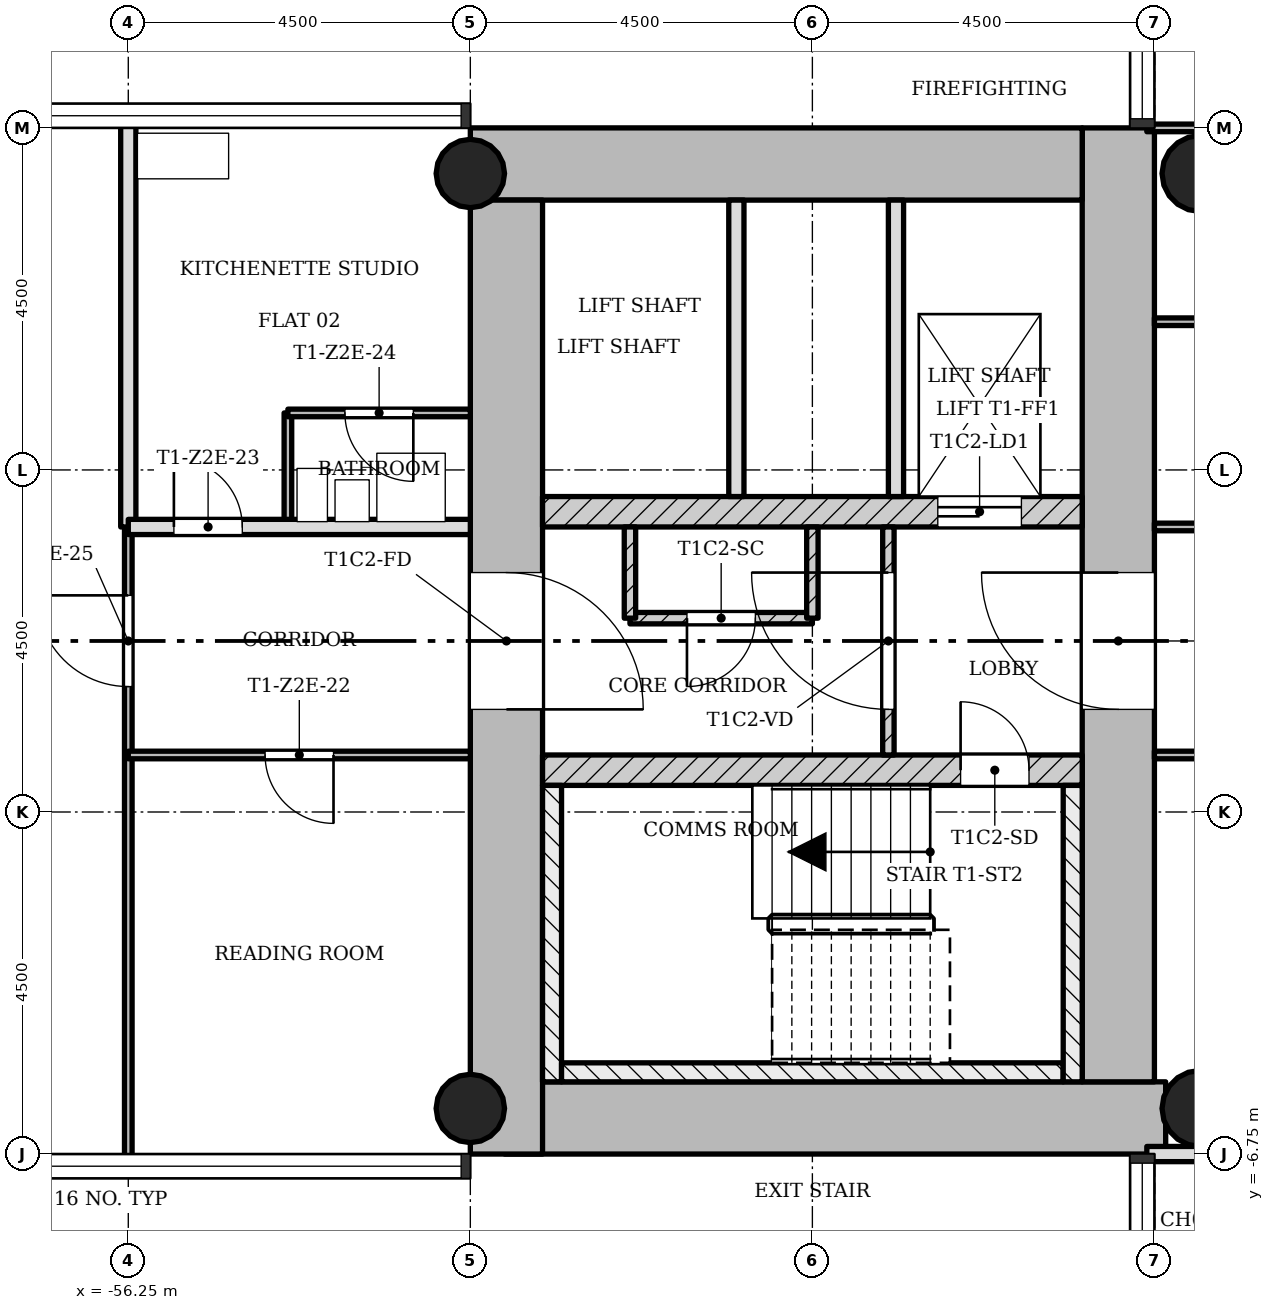
"""IFC4 building model, lengths in metres.
Left out: names, types, materials, properties, quantities, classifications, styles, units other than length and angle.
Written with IfcOpenShell. Run it as: python <this file> out.ifc"""

import sys

from ifc_helpers import new_model, si_unit, direction, frame, frame_2d, origin, origin_2d, place, context, subcontext, project, spatial, rectangle, hollow_circle, extrude, element, fill, save


model = new_model("IFC4")
c1 = context("Model", 3, precision=1e-05, world=origin(), true_north=direction((0.0, 1.0)))
c2 = subcontext(c1, "Body", "Model", "MODEL_VIEW")
j1 = project(units=[si_unit("LENGTHUNIT", "METRE"), si_unit("PLANEANGLEUNIT", "RADIAN")], contexts=[c1])
p1 = place(None, origin())
s1 = spatial("IfcSite", under=j1, at=p1, CompositionType="ELEMENT")
p2 = place(p1, origin())
s2 = spatial("IfcBuilding", under=s1, at=p2, CompositionType="ELEMENT")
p3 = place(p2, frame((0.0, 0.0, 103.8)))
s3 = spatial("IfcBuildingStorey", under=s2, at=p3, CompositionType="ELEMENT", Elevation=103.8)
p4 = place(p3, frame((-51.298, -6.275, 0.0), z_axis=(0.0, 0.0, 1.0), x_axis=(1.0, 0.0, 0.0)))
e1 = element("IfcWall", 1, at=p4, inside=s3, PredefinedType="SHEAR", context=c2, shape_type="SweptSolid", body=[
    extrude(rectangle(XDim=8.696, YDim=0.95, at=frame_2d((4.348, 0.0))), origin(), (0.0, 0.0, 1.0), 3.4),
])
p5 = place(p3, frame((-43.225, -5.8, 0.0), z_axis=(0.0, 0.0, 1.0), x_axis=(0.0, 1.0, 0.0)))
e2 = element("IfcWall", 2, at=p5, inside=s3, PredefinedType="SHEAR", context=c2, shape_type="SweptSolid", body=[
    extrude(rectangle(XDim=12.55, YDim=0.95, at=frame_2d((6.275, 0.0))), origin(), (0.0, 0.0, 1.0), 3.4),
])
p6 = place(p5, frame((4.9, 0.0, 0.0)))
e3 = element("IfcOpeningElement", 3, at=p6, cuts=e2, PredefinedType="OPENING", context=c2, shape_type="SweptSolid", body=[
    extrude(rectangle(XDim=1.8, YDim=2.1, at=frame_2d((0.9, 1.05))), frame((0.0, 0.485, 0.0), z_axis=(0.0, -1.0, 0.0), x_axis=(1.0, 0.0, 0.0)), (0.0, 0.0, 1.0), 0.97),
])
p7 = place(p3, frame((-43.7, 6.275, 0.0), z_axis=(0.0, 0.0, 1.0), x_axis=(-1.0, 0.0, 0.0)))
e4 = element("IfcWall", 4, at=p7, inside=s3, PredefinedType="SHEAR", context=c2, shape_type="SweptSolid", body=[
    extrude(rectangle(XDim=8.05, YDim=0.95, at=frame_2d((4.025, 0.0))), origin(), (0.0, 0.0, 1.0), 3.4),
])
p8 = place(p3, frame((-51.275, 5.8, 0.0), z_axis=(0.0, 0.0, 1.0), x_axis=(0.0, -1.0, 0.0)))
e5 = element("IfcWall", 5, at=p8, inside=s3, PredefinedType="SHEAR", context=c2, shape_type="SweptSolid", body=[
    extrude(rectangle(XDim=12.55, YDim=0.95, at=frame_2d((6.275, 0.0))), origin(), (0.0, 0.0, 1.0), 3.4),
])
p9 = place(p8, frame((4.9, 0.0, 0.0)))
e6 = element("IfcOpeningElement", 6, at=p9, cuts=e5, PredefinedType="OPENING", context=c2, shape_type="SweptSolid", body=[
    extrude(rectangle(XDim=1.8, YDim=2.1, at=frame_2d((0.9, 1.05))), frame((0.0, 0.485, 0.0), z_axis=(0.0, -1.0, 0.0), x_axis=(1.0, 0.0, 0.0)), (0.0, 0.0, 1.0), 0.97),
])
p10 = place(p3, frame((-50.8, -1.7, 0.0), z_axis=(0.0, 0.0, 1.0), x_axis=(1.0, 0.0, 0.0)))
e7 = element("IfcWall", 7, at=p10, inside=s3, PredefinedType="SHEAR", context=c2, shape_type="SweptSolid", body=[
    extrude(rectangle(XDim=7.1, YDim=0.4, at=frame_2d((3.55, 0.0))), origin(), (0.0, 0.0, 1.0), 3.4),
])
p11 = place(p10, frame((5.5, 0.0, 0.0)))
e8 = element("IfcOpeningElement", 8, at=p11, cuts=e7, PredefinedType="OPENING", context=c2, shape_type="SweptSolid", body=[
    extrude(rectangle(XDim=0.9, YDim=2.1, at=frame_2d((0.45, 1.05))), frame((0.0, 0.21, 0.0), z_axis=(0.0, -1.0, 0.0), x_axis=(1.0, 0.0, 0.0)), (0.0, 0.0, 1.0), 0.42),
])
p12 = place(p3, frame((-50.8, 1.7, 0.0), z_axis=(0.0, 0.0, 1.0), x_axis=(1.0, 0.0, 0.0)))
e9 = element("IfcWall", 9, at=p12, inside=s3, PredefinedType="SHEAR", context=c2, shape_type="SweptSolid", body=[
    extrude(rectangle(XDim=7.1, YDim=0.4, at=frame_2d((3.55, 0.0))), origin(), (0.0, 0.0, 1.0), 3.4),
])
p13 = place(p12, frame((5.2, 0.0, 0.0)))
e10 = element("IfcOpeningElement", 10, at=p13, cuts=e9, PredefinedType="OPENING", context=c2, shape_type="SweptSolid", body=[
    extrude(rectangle(XDim=1.1, YDim=2.1, at=frame_2d((0.55, 1.05))), frame((0.0, 0.21, 0.0), z_axis=(0.0, -1.0, 0.0), x_axis=(1.0, 0.0, 0.0)), (0.0, 0.0, 1.0), 0.42),
])
for number, where, z_axis, x_axis in (
    (11, (-51.75, -6.15, 0.0), (0.0, 0.0, 1.0), (1.0, 0.0, 0.0)),
    (12, (-51.75, 6.15, 0.0), (0.0, 0.0, 1.0), (1.0, 0.0, 0.0)),
):
    element("IfcColumn", number, at=place(p3, frame(where, z_axis=z_axis, x_axis=x_axis)), inside=s3, PredefinedType="COLUMN", context=c2, shape_type="SweptSolid", body=[
        extrude(hollow_circle(Radius=0.45, WallThickness=0.032, at=origin_2d()), origin(), (0.0, 0.0, 1.0), 3.4),
    ])
for number, where, z_axis, x_axis in (
    (13, (-42.15, -6.15, 0.0), (0.0, 0.0, 1.0), (1.0, 0.0, 0.0)),
    (14, (-42.15, 6.15, 0.0), (0.0, 0.0, 1.0), (1.0, 0.0, 0.0)),
):
    element("IfcColumn", number, at=place(p3, frame(where, z_axis=z_axis, x_axis=x_axis)), inside=s3, PredefinedType="COLUMN", context=c2, shape_type="SweptSolid", body=[
        extrude(hollow_circle(Radius=0.5, WallThickness=0.036, at=origin_2d()), origin(), (0.0, 0.0, 1.0), 3.4),
    ])
p14 = place(p3, frame((-46.25, 1.5, 0.0), z_axis=(0.0, 0.0, 1.0), x_axis=(0.0, -1.0, 0.0)))
e15 = element("IfcWall", 15, at=p14, inside=s3, PredefinedType="PARTITIONING", context=c2, shape_type="SweptSolid", body=[
    extrude(rectangle(XDim=3.0, YDim=0.15, at=frame_2d((1.5, 0.0))), origin(), (0.0, 0.0, 1.0), 3.0),
])
p15 = place(p14, frame((0.6, 0.0, 0.0)))
e16 = element("IfcOpeningElement", 16, at=p15, cuts=e15, PredefinedType="OPENING", context=c2, shape_type="SweptSolid", body=[
    extrude(rectangle(XDim=1.8, YDim=2.1, at=frame_2d((0.9, 1.05))), frame((0.0, 0.085, 0.0), z_axis=(0.0, -1.0, 0.0), x_axis=(1.0, 0.0, 0.0)), (0.0, 0.0, 1.0), 0.17),
])
for number, where, z_axis, x_axis in (
    (17, (-46.15, 5.8, 0.0), (0.0, 0.0, 1.0), (0.0, -1.0, 0.0)),
    (18, (-48.25, 5.8, 0.0), (0.0, 0.0, 1.0), (0.0, -1.0, 0.0)),
):
    element("IfcWall", number, at=place(p3, frame(where, z_axis=z_axis, x_axis=x_axis)), inside=s3, PredefinedType="SOLIDWALL", context=c2, shape_type="SweptSolid", body=[
        extrude(rectangle(XDim=3.9, YDim=0.2, at=frame_2d((1.95, 0.0))), origin(), (0.0, 0.0, 1.0), 3.0),
    ])
p16 = place(p3, frame((-47.25, 0.3, 0.0), z_axis=(0.0, 0.0, 1.0), x_axis=(-1.0, 0.0, 0.0)))
e19 = element("IfcWall", 19, at=p16, inside=s3, PredefinedType="PARTITIONING", context=c2, shape_type="SweptSolid", body=[
    extrude(rectangle(XDim=2.4, YDim=0.15, at=frame_2d((1.2, 0.0))), origin(), (0.0, 0.0, 1.0), 3.0),
])
p17 = place(p16, frame((0.75, 0.0, 0.0)))
e20 = element("IfcOpeningElement", 20, at=p17, cuts=e19, PredefinedType="OPENING", context=c2, shape_type="SweptSolid", body=[
    extrude(rectangle(XDim=0.9, YDim=2.1, at=frame_2d((0.45, 1.05))), frame((0.0, 0.085, 0.0), z_axis=(0.0, -1.0, 0.0), x_axis=(1.0, 0.0, 0.0)), (0.0, 0.0, 1.0), 0.17),
])
for number, where, z_axis, x_axis in (
    (21, (-47.25, 0.3, 0.0), (0.0, 0.0, 1.0), (0.0, 1.0, 0.0)),
    (22, (-49.65, 0.3, 0.0), (0.0, 0.0, 1.0), (0.0, 1.0, 0.0)),
):
    element("IfcWall", number, at=place(p3, frame(where, z_axis=z_axis, x_axis=x_axis)), inside=s3, PredefinedType="PARTITIONING", context=c2, shape_type="SweptSolid", body=[
        extrude(rectangle(XDim=1.2, YDim=0.15, at=frame_2d((0.6, 0.0))), origin(), (0.0, 0.0, 1.0), 3.0),
    ])
p18 = place(p3, frame((-56.25, -6.85, 0.0), z_axis=(0.0, 0.0, 1.0), x_axis=(0.0, 1.0, 0.0)))
e23 = element("IfcWall", 23, at=p18, inside=s3, PredefinedType="PARTITIONING", context=c2, shape_type="SweptSolid", body=[
    extrude(rectangle(XDim=8.35, YDim=0.1, at=frame_2d((4.175, 0.0))), origin(), (0.0, 0.0, 1.0), 3.0),
])
p19 = place(p18, frame((6.25, 0.0, 0.0)))
e24 = element("IfcOpeningElement", 24, at=p19, cuts=e23, PredefinedType="OPENING", context=c2, shape_type="SweptSolid", body=[
    extrude(rectangle(XDim=1.2, YDim=2.1, at=frame_2d((0.6, 1.05))), frame((0.0, 0.06, 0.0), z_axis=(0.0, -1.0, 0.0), x_axis=(1.0, 0.0, 0.0)), (0.0, 0.0, 1.0), 0.12),
])
p20 = place(p3, frame((-56.25, 1.5, 0.0), z_axis=(0.0, 0.0, 1.0), x_axis=(0.0, 1.0, 0.0)))
e25 = element("IfcWall", 25, at=p20, inside=s3, PredefinedType="SOLIDWALL", context=c2, shape_type="SweptSolid", body=[
    extrude(rectangle(XDim=5.35, YDim=0.2, at=frame_2d((2.675, 0.0))), origin(), (0.0, 0.0, 1.0), 3.0),
])
p21 = place(p3, frame((-54.15, 1.5, 0.0), z_axis=(0.0, 0.0, 1.0), x_axis=(0.0, 1.0, 0.0)))
e26 = element("IfcWall", 26, at=p21, inside=s3, PredefinedType="PARTITIONING", context=c2, shape_type="SweptSolid", body=[
    extrude(rectangle(XDim=1.5, YDim=0.1, at=frame_2d((0.75, 0.0))), origin(), (0.0, 0.0, 1.0), 3.0),
])
p22 = place(p3, frame((-42.85, -6.75, 0.0), z_axis=(0.0, 0.0, 1.0), x_axis=(1.0, 0.0, 0.0)))
e27 = element("IfcWall", 27, at=p22, inside=s3, PredefinedType="SOLIDWALL", context=c2, shape_type="SweptSolid", body=[
    extrude(rectangle(XDim=5.95, YDim=0.2, at=frame_2d((2.975, 0.0))), origin(), (0.0, 0.0, 1.0), 3.0),
])
p23 = place(p3, frame((-56.25, -1.5, 0.0), z_axis=(0.0, 0.0, 1.0), x_axis=(1.0, 0.0, 0.0)))
e28 = element("IfcWall", 28, at=p23, inside=s3, PredefinedType="PARTITIONING", context=c2, shape_type="SweptSolid", body=[
    extrude(rectangle(XDim=4.5, YDim=0.1, at=frame_2d((2.25, 0.0))), origin(), (0.0, 0.0, 1.0), 3.0),
])
p24 = place(p23, frame((1.8, 0.0, 0.0)))
e29 = element("IfcOpeningElement", 29, at=p24, cuts=e28, PredefinedType="OPENING", context=c2, shape_type="SweptSolid", body=[
    extrude(rectangle(XDim=0.9, YDim=2.1, at=frame_2d((0.45, 1.05))), frame((0.0, 0.06, 0.0), z_axis=(0.0, -1.0, 0.0), x_axis=(1.0, 0.0, 0.0)), (0.0, 0.0, 1.0), 0.12),
])
p25 = place(p3, frame((-42.75, -1.5, 0.0), z_axis=(0.0, 0.0, 1.0), x_axis=(1.0, 0.0, 0.0)))
e30 = element("IfcWall", 30, at=p25, inside=s3, PredefinedType="PARTITIONING", context=c2, shape_type="SweptSolid", body=[
    extrude(rectangle(XDim=5.85, YDim=0.1, at=frame_2d((2.925, 0.0))), origin(), (0.0, 0.0, 1.0), 3.0),
])
p26 = place(p25, frame((2.475, 0.0, 0.0)))
e31 = element("IfcOpeningElement", 31, at=p26, cuts=e30, PredefinedType="OPENING", context=c2, shape_type="SweptSolid", body=[
    extrude(rectangle(XDim=0.9, YDim=2.1, at=frame_2d((0.45, 1.05))), frame((0.0, 0.06, 0.0), z_axis=(0.0, -1.0, 0.0), x_axis=(1.0, 0.0, 0.0)), (0.0, 0.0, 1.0), 0.12),
])
p27 = place(p3, frame((-42.75, 1.5, 0.0), z_axis=(0.0, 0.0, 1.0), x_axis=(1.0, 0.0, 0.0)))
e32 = element("IfcWall", 32, at=p27, inside=s3, PredefinedType="PARTITIONING", context=c2, shape_type="SweptSolid", body=[
    extrude(rectangle(XDim=5.85, YDim=0.1, at=frame_2d((2.925, 0.0))), origin(), (0.0, 0.0, 1.0), 3.0),
])
p28 = place(p27, frame((2.475, 0.0, 0.0)))
e33 = element("IfcOpeningElement", 33, at=p28, cuts=e32, PredefinedType="OPENING", context=c2, shape_type="SweptSolid", body=[
    extrude(rectangle(XDim=0.9, YDim=2.1, at=frame_2d((0.45, 1.05))), frame((0.0, 0.06, 0.0), z_axis=(0.0, -1.0, 0.0), x_axis=(1.0, 0.0, 0.0)), (0.0, 0.0, 1.0), 0.12),
])
p29 = place(p3, frame((-56.25, 1.5, 0.0), z_axis=(0.0, 0.0, 1.0), x_axis=(1.0, 0.0, 0.0)))
e34 = element("IfcWall", 34, at=p29, inside=s3, PredefinedType="SOLIDWALL", context=c2, shape_type="SweptSolid", body=[
    extrude(rectangle(XDim=4.5, YDim=0.2, at=frame_2d((2.25, 0.0))), origin(), (0.0, 0.0, 1.0), 3.0),
])
p30 = place(p29, frame((0.6, 0.0, 0.0)))
e35 = element("IfcOpeningElement", 35, at=p30, cuts=e34, PredefinedType="OPENING", context=c2, shape_type="SweptSolid", body=[
    extrude(rectangle(XDim=0.9, YDim=2.1, at=frame_2d((0.45, 1.05))), frame((0.0, 0.11, 0.0), z_axis=(0.0, -1.0, 0.0), x_axis=(1.0, 0.0, 0.0)), (0.0, 0.0, 1.0), 0.22),
])
p31 = place(p3, frame((-54.15, 3.0, 0.0), z_axis=(0.0, 0.0, 1.0), x_axis=(1.0, 0.0, 0.0)))
e36 = element("IfcWall", 36, at=p31, inside=s3, PredefinedType="PARTITIONING", context=c2, shape_type="SweptSolid", body=[
    extrude(rectangle(XDim=2.4, YDim=0.1, at=frame_2d((1.2, 0.0))), origin(), (0.0, 0.0, 1.0), 3.0),
])
p32 = place(p31, frame((0.75, 0.0, 0.0)))
e37 = element("IfcOpeningElement", 37, at=p32, cuts=e36, PredefinedType="OPENING", context=c2, shape_type="SweptSolid", body=[
    extrude(rectangle(XDim=0.9, YDim=2.1, at=frame_2d((0.45, 1.05))), frame((0.0, 0.06, 0.0), z_axis=(0.0, -1.0, 0.0), x_axis=(1.0, 0.0, 0.0)), (0.0, 0.0, 1.0), 0.12),
])
p33 = place(p3, frame((-42.75, 4.2, 0.0), z_axis=(0.0, 0.0, 1.0), x_axis=(1.0, 0.0, 0.0)))
e38 = element("IfcWall", 38, at=p33, inside=s3, PredefinedType="PARTITIONING", context=c2, shape_type="SweptSolid", body=[
    extrude(rectangle(XDim=5.85, YDim=0.1, at=frame_2d((2.925, 0.0))), origin(), (0.0, 0.0, 1.0), 3.0),
])
p34 = place(p3, frame((-42.85, 6.75, 0.0), z_axis=(0.0, 0.0, 1.0), x_axis=(1.0, 0.0, 0.0)))
e39 = element("IfcWall", 39, at=p34, inside=s3, PredefinedType="PARTITIONING", context=c2, shape_type="SweptSolid", body=[
    extrude(rectangle(XDim=5.95, YDim=0.1, at=frame_2d((2.975, 0.0))), origin(), (0.0, 0.0, 1.0), 3.0),
])
p35 = place(p3, frame((-50.675, -1.9, 0.0), z_axis=(0.0, 0.0, 1.0), x_axis=(0.0, -1.0, 0.0)))
e40 = element("IfcWall", 40, at=p35, inside=s3, PredefinedType="SHEAR", context=c2, shape_type="SweptSolid", body=[
    extrude(rectangle(XDim=3.9, YDim=0.25, at=frame_2d((1.95, 0.0))), origin(), (0.0, 0.0, 1.0), 3.4),
])
p36 = place(p3, frame((-43.95, -5.675, 0.0), z_axis=(0.0, 0.0, 1.0), x_axis=(-1.0, 0.0, 0.0)))
e41 = element("IfcWall", 41, at=p36, inside=s3, PredefinedType="SHEAR", context=c2, shape_type="SweptSolid", body=[
    extrude(rectangle(XDim=6.6, YDim=0.25, at=frame_2d((3.3, 0.0))), origin(), (0.0, 0.0, 1.0), 3.4),
])
p37 = place(p3, frame((-43.825, -1.9, 0.0), z_axis=(0.0, 0.0, 1.0), x_axis=(0.0, -1.0, 0.0)))
e42 = element("IfcWall", 42, at=p37, inside=s3, PredefinedType="SHEAR", context=c2, shape_type="SweptSolid", body=[
    extrude(rectangle(XDim=3.9, YDim=0.25, at=frame_2d((1.95, 0.0))), origin(), (0.0, 0.0, 1.0), 3.4),
])
p38 = place(p15, origin())
e43 = element("IfcDoor", 43, at=p38, inside=s3, OperationType="SINGLE_SWING_LEFT", PredefinedType="DOOR", context=c2, shape_type="SweptSolid", body=[
    extrude(rectangle(XDim=1.8, YDim=2.1, at=frame_2d((0.9, 1.05))), frame((0.0, 0.025, 0.0), z_axis=(0.0, -1.0, 0.0), x_axis=(1.0, 0.0, 0.0)), (0.0, 0.0, 1.0), 0.05),
])
fill(e16, e43)
p39 = place(p17, origin())
e44 = element("IfcDoor", 44, at=p39, inside=s3, OperationType="SINGLE_SWING_LEFT", PredefinedType="DOOR", context=c2, shape_type="SweptSolid", body=[
    extrude(rectangle(XDim=0.9, YDim=2.1, at=frame_2d((0.45, 1.05))), frame((0.0, 0.025, 0.0), z_axis=(0.0, -1.0, 0.0), x_axis=(1.0, 0.0, 0.0)), (0.0, 0.0, 1.0), 0.05),
])
fill(e20, e44)
p40 = place(p24, origin())
e45 = element("IfcDoor", 45, at=p40, inside=s3, OperationType="SINGLE_SWING_RIGHT", PredefinedType="DOOR", context=c2, shape_type="SweptSolid", body=[
    extrude(rectangle(XDim=0.9, YDim=2.1, at=frame_2d((0.45, 1.05))), frame((0.0, 0.025, 0.0), z_axis=(0.0, -1.0, 0.0), x_axis=(1.0, 0.0, 0.0)), (0.0, 0.0, 1.0), 0.05),
])
fill(e29, e45)
p41 = place(p30, origin())
e46 = element("IfcDoor", 46, at=p41, inside=s3, OperationType="SINGLE_SWING_RIGHT", PredefinedType="DOOR", context=c2, shape_type="SweptSolid", body=[
    extrude(rectangle(XDim=0.9, YDim=2.1, at=frame_2d((0.45, 1.05))), frame((0.0, 0.025, 0.0), z_axis=(0.0, -1.0, 0.0), x_axis=(1.0, 0.0, 0.0)), (0.0, 0.0, 1.0), 0.05),
])
fill(e35, e46)
p42 = place(p32, origin())
e47 = element("IfcDoor", 47, at=p42, inside=s3, OperationType="SINGLE_SWING_RIGHT", PredefinedType="DOOR", context=c2, shape_type="SweptSolid", body=[
    extrude(rectangle(XDim=0.9, YDim=2.1, at=frame_2d((0.45, 1.05))), frame((0.0, 0.025, 0.0), z_axis=(0.0, -1.0, 0.0), x_axis=(1.0, 0.0, 0.0)), (0.0, 0.0, 1.0), 0.05),
])
fill(e37, e47)
p43 = place(p19, origin())
e48 = element("IfcDoor", 48, at=p43, inside=s3, OperationType="SINGLE_SWING_LEFT", PredefinedType="DOOR", context=c2, shape_type="SweptSolid", body=[
    extrude(rectangle(XDim=1.2, YDim=2.1, at=frame_2d((0.6, 1.05))), frame((0.0, 0.025, 0.0), z_axis=(0.0, -1.0, 0.0), x_axis=(1.0, 0.0, 0.0)), (0.0, 0.0, 1.0), 0.05),
])
fill(e24, e48)
p44 = place(p11, origin())
e49 = element("IfcDoor", 49, at=p44, inside=s3, OperationType="SINGLE_SWING_RIGHT", PredefinedType="DOOR", context=c2, shape_type="SweptSolid", body=[
    extrude(rectangle(XDim=0.9, YDim=2.1, at=frame_2d((0.45, 1.05))), frame((0.0, 0.025, 0.0), z_axis=(0.0, -1.0, 0.0), x_axis=(1.0, 0.0, 0.0)), (0.0, 0.0, 1.0), 0.05),
])
fill(e8, e49)
p45 = place(p13, origin())
e50 = element("IfcDoor", 50, at=p45, inside=s3, OperationType="SLIDING_TO_LEFT", PredefinedType="DOOR", context=c2, shape_type="SweptSolid", body=[
    extrude(rectangle(XDim=1.1, YDim=2.1, at=frame_2d((0.55, 1.05))), frame((0.0, 0.025, 0.0), z_axis=(0.0, -1.0, 0.0), x_axis=(1.0, 0.0, 0.0)), (0.0, 0.0, 1.0), 0.05),
])
fill(e10, e50)
p46 = place(p6, origin())
e51 = element("IfcDoor", 51, at=p46, inside=s3, OperationType="SINGLE_SWING_LEFT", PredefinedType="DOOR", context=c2, shape_type="SweptSolid", body=[
    extrude(rectangle(XDim=1.8, YDim=2.1, at=frame_2d((0.9, 1.05))), frame((0.0, 0.025, 0.0), z_axis=(0.0, -1.0, 0.0), x_axis=(1.0, 0.0, 0.0)), (0.0, 0.0, 1.0), 0.05),
])
fill(e3, e51)
p47 = place(p9, origin())
e52 = element("IfcDoor", 52, at=p47, inside=s3, OperationType="SINGLE_SWING_LEFT", PredefinedType="DOOR", context=c2, shape_type="SweptSolid", body=[
    extrude(rectangle(XDim=1.8, YDim=2.1, at=frame_2d((0.9, 1.05))), frame((0.0, 0.025, 0.0), z_axis=(0.0, -1.0, 0.0), x_axis=(1.0, 0.0, 0.0)), (0.0, 0.0, 1.0), 0.05),
])
fill(e6, e52)
save(model, sys.argv[1])
